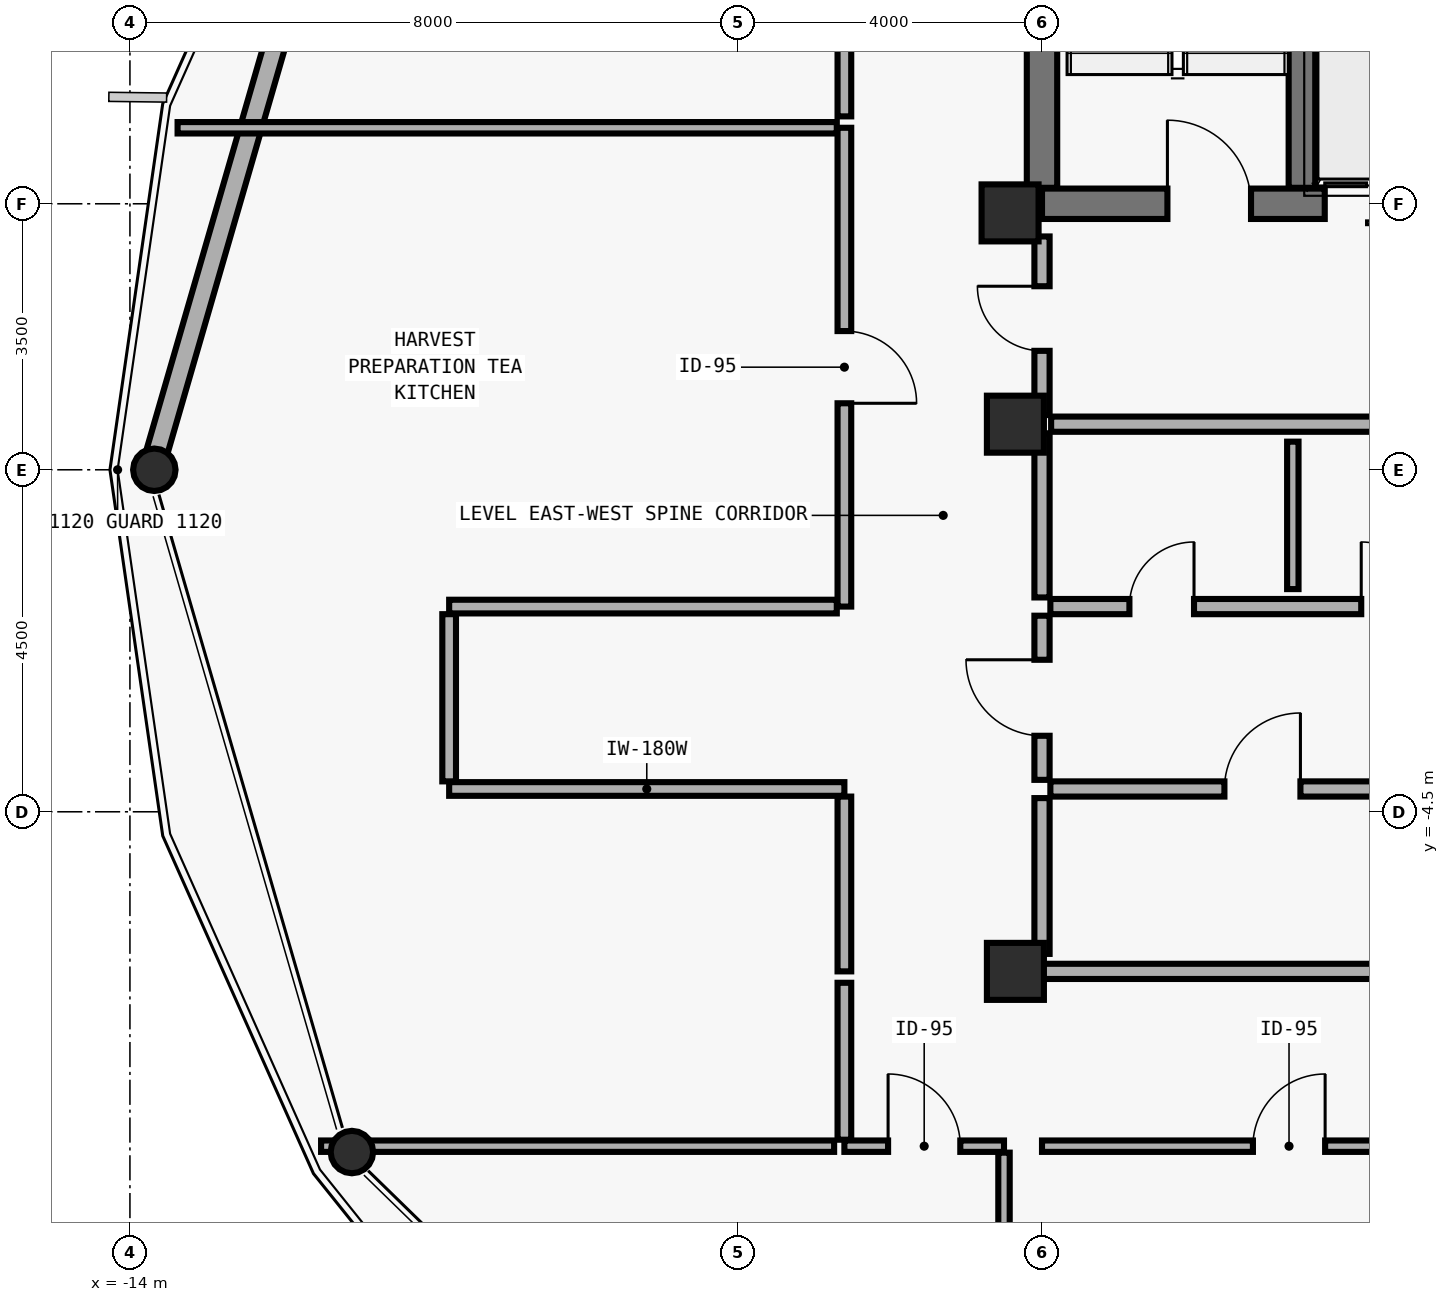
"""IFC4 building model, lengths in metres.
Left out: names, types, materials, properties, quantities, classifications, styles, units other than length and angle.
Written with IfcOpenShell. Run it as: python <this file> out.ifc"""

import sys

from ifc_helpers import new_model, si_unit, direction, frame, frame_2d, origin, origin_2d, place, context, subcontext, project, spatial, rectangle, hollow_circle, extrude, element, fill, save


model = new_model("IFC4")
c1 = context("Model", 3, precision=1e-05, world=origin(), true_north=direction((0.0, 1.0)))
c2 = subcontext(c1, "Body", "Model", "MODEL_VIEW")
j1 = project(units=[si_unit("LENGTHUNIT", "METRE"), si_unit("PLANEANGLEUNIT", "RADIAN")], contexts=[c1])
p1 = place(None, origin())
s1 = spatial("IfcSite", under=j1, at=p1, CompositionType="ELEMENT")
p2 = place(p1, origin())
s2 = spatial("IfcBuilding", under=s1, at=p2, CompositionType="ELEMENT")
p3 = place(p2, frame((0.0, 0.0, 245.4)))
s3 = spatial("IfcBuildingStorey", under=s2, at=p3, CompositionType="ELEMENT", Elevation=245.4)
p4 = place(p3, frame((-2.0, 3.5, 0.0), z_axis=(0.0, 0.0, 1.0), x_axis=(1.0, 0.0, 0.0)))
e1 = element("IfcWall", 1, at=p4, inside=s3, PredefinedType="SHEAR", context=c2, shape_type="SweptSolid", body=[
    extrude(rectangle(XDim=10.0, YDim=0.4, at=frame_2d((5.0, 0.0))), origin(), (0.0, 0.0, 1.0), 3.592),
])
p5 = place(p4, frame((1.65, 0.0, 0.0)))
e2 = element("IfcOpeningElement", 2, at=p5, cuts=e1, PredefinedType="OPENING", context=c2, shape_type="SweptSolid", body=[
    extrude(rectangle(XDim=1.1, YDim=2.15, at=frame_2d((0.55, 1.075))), frame((0.0, 0.21, 0.0), z_axis=(0.0, -1.0, 0.0), x_axis=(1.0, 0.0, 0.0)), (0.0, 0.0, 1.0), 0.42),
])
p6 = place(p4, frame((7.65, 0.0, 0.0)))
e3 = element("IfcOpeningElement", 3, at=p6, cuts=e1, PredefinedType="OPENING", context=c2, shape_type="SweptSolid", body=[
    extrude(rectangle(XDim=1.1, YDim=2.15, at=frame_2d((0.55, 1.075))), frame((0.0, 0.21, 0.0), z_axis=(0.0, -1.0, 0.0), x_axis=(1.0, 0.0, 0.0)), (0.0, 0.0, 1.0), 0.42),
])
p7 = place(p4, frame((3.72, 0.0, 0.0)))
e4 = element("IfcOpeningElement", 4, at=p7, cuts=e1, PredefinedType="OPENING", context=c2, shape_type="SweptSolid", body=[
    extrude(rectangle(XDim=1.1, YDim=2.2, at=frame_2d((0.55, 1.1))), frame((0.0, 0.21, 0.0), z_axis=(0.0, -1.0, 0.0), x_axis=(1.0, 0.0, 0.0)), (0.0, 0.0, 1.0), 0.42),
])
p8 = place(p4, frame((5.18, 0.0, 0.0)))
e5 = element("IfcOpeningElement", 5, at=p8, cuts=e1, PredefinedType="OPENING", context=c2, shape_type="SweptSolid", body=[
    extrude(rectangle(XDim=1.1, YDim=2.2, at=frame_2d((0.55, 1.1))), frame((0.0, 0.21, 0.0), z_axis=(0.0, -1.0, 0.0), x_axis=(1.0, 0.0, 0.0)), (0.0, 0.0, 1.0), 0.42),
])
p9 = place(p3, frame((-2.0, 3.71, 0.0), z_axis=(0.0, 0.0, 1.0), x_axis=(0.0, 1.0, 0.0)))
e6 = element("IfcWall", 6, at=p9, inside=s3, PredefinedType="SHEAR", context=c2, shape_type="SweptSolid", body=[
    extrude(rectangle(XDim=8.58, YDim=0.4, at=frame_2d((4.29, 0.0))), origin(), (0.0, 0.0, 1.0), 3.592),
])
p10 = place(p3, frame((1.42, 3.71, 0.0), z_axis=(0.0, 0.0, 1.0), x_axis=(0.0, 1.0, 0.0)))
e7 = element("IfcWall", 7, at=p10, inside=s3, PredefinedType="SHEAR", context=c2, shape_type="SweptSolid", body=[
    extrude(rectangle(XDim=8.58, YDim=0.35, at=frame_2d((4.29, 0.0))), origin(), (0.0, 0.0, 1.0), 3.592),
])
for number, where, z_axis, x_axis in (
    (8, (-2.42, 3.38, 0.0), (0.0, 0.0, 1.0), (1.0, 0.0, 0.0)),
    (9, (-2.35, 0.6, 0.0), (0.0, 0.0, 1.0), (1.0, 0.0, 0.0)),
    (10, (-2.35, -6.6, 0.0), (0.0, 0.0, 1.0), (1.0, 0.0, 0.0)),
):
    element("IfcColumn", number, at=place(p3, frame(where, z_axis=z_axis, x_axis=x_axis)), inside=s3, PredefinedType="COLUMN", context=c2, shape_type="SweptSolid", body=[
        extrude(rectangle(XDim=0.75, YDim=0.75, at=origin_2d()), origin(), (0.0, 0.0, 1.0), 3.575),
    ])
p11 = place(p3, frame((-13.713, 0.0, 0.0), z_axis=(0.018980464328, 0.0, 0.999819854761), x_axis=(0.0, 1.0, 0.0)))
e11 = element("IfcColumn", 11, at=p11, inside=s3, PredefinedType="COLUMN", context=c2, shape_type="SweptSolid", body=[
    extrude(hollow_circle(Radius=0.28, WallThickness=0.02, at=origin_2d()), origin(), (0.0, 0.0, 1.0), 3.576),
])
p12 = place(p3, frame((-11.109, -8.986, 0.0), z_axis=(0.016454846564, 0.004642861271, 0.999853830249), x_axis=(-0.271555014366, 0.962422918562, 0.0)))
e12 = element("IfcColumn", 12, at=p12, inside=s3, PredefinedType="COLUMN", context=c2, shape_type="SweptSolid", body=[
    extrude(hollow_circle(Radius=0.28, WallThickness=0.02, at=origin_2d()), origin(), (0.0, 0.0, 1.0), 3.576),
])
p13 = place(p3, frame((-13.648, 0.225, 0.0), z_axis=(0.0, 0.0, 1.0), x_axis=(0.278336910571, 0.960483505436, 0.0)))
e13 = element("IfcWall", 13, at=p13, inside=s3, PredefinedType="SOLIDWALL", context=c2, shape_type="SweptSolid", body=[
    extrude(rectangle(XDim=8.886, YDim=0.28, at=frame_2d((4.443, 0.0))), origin(), (0.0, 0.0, 1.0), 2.97),
])
p14 = place(p3, frame((-2.0, 0.72, 0.0), z_axis=(0.0, 0.0, 1.0), x_axis=(0.0, 1.0, 0.0)))
e14 = element("IfcWall", 14, at=p14, inside=s3, PredefinedType="MOVABLE", context=c2, shape_type="SweptSolid", body=[
    extrude(rectangle(XDim=2.35, YDim=0.2, at=frame_2d((1.175, 0.0))), origin(), (0.0, 0.0, 1.0), 2.692),
])
p15 = place(p14, frame((0.845, 0.0, 0.0)))
e15 = element("IfcOpeningElement", 15, at=p15, cuts=e14, PredefinedType="OPENING", context=c2, shape_type="SweptSolid", body=[
    extrude(rectangle(XDim=0.85, YDim=2.1, at=frame_2d((0.425, 1.05))), frame((0.0, 0.11, 0.0), z_axis=(0.0, -1.0, 0.0), x_axis=(1.0, 0.0, 0.0)), (0.0, 0.0, 1.0), 0.22),
])
p16 = place(p3, frame((-2.0, -4.08, 0.0), z_axis=(0.0, 0.0, 1.0), x_axis=(0.0, 1.0, 0.0)))
e16 = element("IfcWall", 16, at=p16, inside=s3, PredefinedType="MOVABLE", context=c2, shape_type="SweptSolid", body=[
    extrude(rectangle(XDim=2.16, YDim=0.2, at=frame_2d((1.08, 0.0))), origin(), (0.0, 0.0, 1.0), 3.072),
])
p17 = place(p16, frame((0.58, 0.0, 0.0)))
e17 = element("IfcOpeningElement", 17, at=p17, cuts=e16, PredefinedType="OPENING", context=c2, shape_type="SweptSolid", body=[
    extrude(rectangle(XDim=1.0, YDim=2.1, at=frame_2d((0.5, 1.05))), frame((0.0, 0.11, 0.0), z_axis=(0.0, -1.0, 0.0), x_axis=(1.0, 0.0, 0.0)), (0.0, 0.0, 1.0), 0.22),
])
p18 = place(p3, frame((-1.89, -1.8, 0.0), z_axis=(0.0, 0.0, 1.0), x_axis=(1.0, 0.0, 0.0)))
e18 = element("IfcWall", 18, at=p18, inside=s3, PredefinedType="MOVABLE", context=c2, shape_type="SweptSolid", body=[
    extrude(rectangle(XDim=5.73, YDim=0.2, at=frame_2d((2.865, 0.0))), origin(), (0.0, 0.0, 1.0), 3.36),
])
p19 = place(p18, frame((1.04, 0.0, 0.0)))
e19 = element("IfcOpeningElement", 19, at=p19, cuts=e18, PredefinedType="OPENING", context=c2, shape_type="SweptSolid", body=[
    extrude(rectangle(XDim=0.85, YDim=2.1, at=frame_2d((0.425, 1.05))), frame((0.0, 0.11, 0.0), z_axis=(0.0, -1.0, 0.0), x_axis=(1.0, 0.0, 0.0)), (0.0, 0.0, 1.0), 0.22),
])
p20 = place(p18, frame((4.09, 0.0, 0.0)))
e20 = element("IfcOpeningElement", 20, at=p20, cuts=e18, PredefinedType="OPENING", context=c2, shape_type="SweptSolid", body=[
    extrude(rectangle(XDim=0.85, YDim=2.1, at=frame_2d((0.425, 1.05))), frame((0.0, 0.11, 0.0), z_axis=(0.0, -1.0, 0.0), x_axis=(1.0, 0.0, 0.0)), (0.0, 0.0, 1.0), 0.22),
])
p21 = place(p3, frame((-1.89, -4.2, 0.0), z_axis=(0.0, 0.0, 1.0), x_axis=(1.0, 0.0, 0.0)))
e21 = element("IfcWall", 21, at=p21, inside=s3, PredefinedType="MOVABLE", context=c2, shape_type="SweptSolid", body=[
    extrude(rectangle(XDim=5.73, YDim=0.2, at=frame_2d((2.865, 0.0))), origin(), (0.0, 0.0, 1.0), 3.36),
])
p22 = place(p21, frame((2.29, 0.0, 0.0)))
e22 = element("IfcOpeningElement", 22, at=p22, cuts=e21, PredefinedType="OPENING", context=c2, shape_type="SweptSolid", body=[
    extrude(rectangle(XDim=1.0, YDim=2.1, at=frame_2d((0.5, 1.05))), frame((0.0, 0.11, 0.0), z_axis=(0.0, -1.0, 0.0), x_axis=(1.0, 0.0, 0.0)), (0.0, 0.0, 1.0), 0.22),
])
p23 = place(p3, frame((-4.6, -8.9, 0.0), z_axis=(0.0, 0.0, 1.0), x_axis=(1.0, 0.0, 0.0)))
e23 = element("IfcWall", 23, at=p23, inside=s3, PredefinedType="PARTITIONING", context=c2, shape_type="SweptSolid", body=[
    extrude(rectangle(XDim=2.1, YDim=0.15, at=frame_2d((1.05, 0.0))), origin(), (0.0, 0.0, 1.0), 3.36),
])
p24 = place(p23, frame((0.575, 0.0, 0.0)))
e24 = element("IfcOpeningElement", 24, at=p24, cuts=e23, PredefinedType="OPENING", context=c2, shape_type="SweptSolid", body=[
    extrude(rectangle(XDim=0.95, YDim=2.1, at=frame_2d((0.475, 1.05))), frame((0.0, 0.085, 0.0), z_axis=(0.0, -1.0, 0.0), x_axis=(1.0, 0.0, 0.0)), (0.0, 0.0, 1.0), 0.17),
])
p25 = place(p3, frame((-2.0, -8.9, 0.0), z_axis=(0.0, 0.0, 1.0), x_axis=(1.0, 0.0, 0.0)))
e25 = element("IfcWall", 25, at=p25, inside=s3, PredefinedType="PARTITIONING", context=c2, shape_type="SweptSolid", body=[
    extrude(rectangle(XDim=6.5, YDim=0.15, at=frame_2d((3.25, 0.0))), origin(), (0.0, 0.0, 1.0), 3.36),
])
p26 = place(p25, frame((2.775, 0.0, 0.0)))
e26 = element("IfcOpeningElement", 26, at=p26, cuts=e25, PredefinedType="OPENING", context=c2, shape_type="SweptSolid", body=[
    extrude(rectangle(XDim=0.95, YDim=2.1, at=frame_2d((0.475, 1.05))), frame((0.0, 0.085, 0.0), z_axis=(0.0, -1.0, 0.0), x_axis=(1.0, 0.0, 0.0)), (0.0, 0.0, 1.0), 0.17),
])
p27 = place(p3, frame((-4.6, 4.5, 0.0), z_axis=(0.0, 0.0, 1.0), x_axis=(0.0, -1.0, 0.0)))
e27 = element("IfcWall", 27, at=p27, inside=s3, PredefinedType="PLUMBINGWALL", context=c2, shape_type="SweptSolid", body=[
    extrude(rectangle(XDim=6.3, YDim=0.18, at=frame_2d((3.15, 0.0))), origin(), (0.0, 0.0, 1.0), 3.36),
])
p28 = place(p27, frame((2.675, 0.0, 0.0)))
e28 = element("IfcOpeningElement", 28, at=p28, cuts=e27, PredefinedType="OPENING", context=c2, shape_type="SweptSolid", body=[
    extrude(rectangle(XDim=0.95, YDim=2.1, at=frame_2d((0.475, 1.05))), frame((0.0, 0.1, 0.0), z_axis=(0.0, -1.0, 0.0), x_axis=(1.0, 0.0, 0.0)), (0.0, 0.0, 1.0), 0.2),
])
p29 = place(p3, frame((-1.88, 0.6, 0.0), z_axis=(0.0, 0.0, 1.0), x_axis=(1.0, 0.0, 0.0)))
e29 = element("IfcWall", 29, at=p29, inside=s3, PredefinedType="MOVABLE", context=c2, shape_type="SweptSolid", body=[
    extrude(rectangle(XDim=5.72, YDim=0.2, at=frame_2d((2.86, 0.0))), origin(), (0.0, 0.0, 1.0), 3.072),
])
p30 = place(p3, frame((1.3, -1.57, 0.0), z_axis=(0.0, 0.0, 1.0), x_axis=(0.0, 1.0, 0.0)))
e30 = element("IfcWall", 30, at=p30, inside=s3, PredefinedType="PARTITIONING", context=c2, shape_type="SweptSolid", body=[
    extrude(rectangle(XDim=1.94, YDim=0.15, at=frame_2d((0.97, 0.0))), origin(), (0.0, 0.0, 1.0), 3.36),
])
p31 = place(p3, frame((-2.0, -1.68, 0.0), z_axis=(0.0, 0.0, 1.0), x_axis=(0.0, 1.0, 0.0)))
e31 = element("IfcWall", 31, at=p31, inside=s3, PredefinedType="MOVABLE", context=c2, shape_type="SweptSolid", body=[
    extrude(rectangle(XDim=2.16, YDim=0.2, at=frame_2d((1.08, 0.0))), origin(), (0.0, 0.0, 1.0), 3.072),
])
p32 = place(p3, frame((-2.0, -6.6, 0.0), z_axis=(0.0, 0.0, 1.0), x_axis=(1.0, 0.0, 0.0)))
e32 = element("IfcWall", 32, at=p32, inside=s3, PredefinedType="MOVABLE", context=c2, shape_type="SweptSolid", body=[
    extrude(rectangle(XDim=5.84, YDim=0.2, at=frame_2d((2.92, 0.0))), origin(), (0.0, 0.0, 1.0), 3.072),
])
p33 = place(p3, frame((-2.0, -6.37, 0.0), z_axis=(0.0, 0.0, 1.0), x_axis=(0.0, 1.0, 0.0)))
e33 = element("IfcWall", 33, at=p33, inside=s3, PredefinedType="MOVABLE", context=c2, shape_type="SweptSolid", body=[
    extrude(rectangle(XDim=2.05, YDim=0.2, at=frame_2d((1.025, 0.0))), origin(), (0.0, 0.0, 1.0), 3.072),
])
p34 = place(p3, frame((-2.5, -8.985, 0.0), z_axis=(0.0, 0.0, 1.0), x_axis=(0.0, -1.0, 0.0)))
e34 = element("IfcWall", 34, at=p34, inside=s3, PredefinedType="PARTITIONING", context=c2, shape_type="SweptSolid", body=[
    extrude(rectangle(XDim=7.706, YDim=0.15, at=frame_2d((3.853, 0.0))), origin(), (0.0, 0.0, 1.0), 2.892),
])
p35 = place(p3, frame((-11.485, -8.9, 0.0), z_axis=(0.0, 0.0, 1.0), x_axis=(1.0, 0.0, 0.0)))
e35 = element("IfcWall", 35, at=p35, inside=s3, PredefinedType="PARTITIONING", context=c2, shape_type="SweptSolid", body=[
    extrude(rectangle(XDim=6.75, YDim=0.15, at=frame_2d((3.375, 0.0))), origin(), (0.0, 0.0, 1.0), 2.892),
])
p36 = place(p3, frame((-4.7, -1.8, 0.0), z_axis=(0.0, 0.0, 1.0), x_axis=(-1.0, 0.0, 0.0)))
e36 = element("IfcWall", 36, at=p36, inside=s3, PredefinedType="PLUMBINGWALL", context=c2, shape_type="SweptSolid", body=[
    extrude(rectangle(XDim=5.1, YDim=0.18, at=frame_2d((2.55, 0.0))), origin(), (0.0, 0.0, 1.0), 3.36),
])
p37 = place(p3, frame((-9.8, -4.2, 0.0), z_axis=(0.0, 0.0, 1.0), x_axis=(1.0, 0.0, 0.0)))
e37 = element("IfcWall", 37, at=p37, inside=s3, PredefinedType="PLUMBINGWALL", context=c2, shape_type="SweptSolid", body=[
    extrude(rectangle(XDim=5.2, YDim=0.18, at=frame_2d((2.6, 0.0))), origin(), (0.0, 0.0, 1.0), 3.36),
])
p38 = place(p3, frame((-9.8, -1.9, 0.0), z_axis=(0.0, 0.0, 1.0), x_axis=(0.0, -1.0, 0.0)))
e38 = element("IfcWall", 38, at=p38, inside=s3, PredefinedType="PLUMBINGWALL", context=c2, shape_type="SweptSolid", body=[
    extrude(rectangle(XDim=2.2, YDim=0.18, at=frame_2d((1.1, 0.0))), origin(), (0.0, 0.0, 1.0), 3.36),
])
p39 = place(p3, frame((-4.6, -4.3, 0.0), z_axis=(0.0, 0.0, 1.0), x_axis=(0.0, -1.0, 0.0)))
e39 = element("IfcWall", 39, at=p39, inside=s3, PredefinedType="PLUMBINGWALL", context=c2, shape_type="SweptSolid", body=[
    extrude(rectangle(XDim=2.3, YDim=0.18, at=frame_2d((1.15, 0.0))), origin(), (0.0, 0.0, 1.0), 3.36),
])
p40 = place(p3, frame((-4.6, -6.75, 0.0), z_axis=(0.0, 0.0, 1.0), x_axis=(0.0, -1.0, 0.0)))
e40 = element("IfcWall", 40, at=p40, inside=s3, PredefinedType="PLUMBINGWALL", context=c2, shape_type="SweptSolid", body=[
    extrude(rectangle(XDim=2.065, YDim=0.18, at=frame_2d((1.032, 0.0))), origin(), (0.0, 0.0, 1.0), 3.36),
])
p41 = place(p3, frame((-13.373, 4.5, 0.0), z_axis=(0.0, 0.0, 1.0), x_axis=(1.0, 0.0, 0.0)))
e41 = element("IfcWall", 41, at=p41, inside=s3, PredefinedType="PARTITIONING", context=c2, shape_type="SweptSolid", body=[
    extrude(rectangle(XDim=8.673, YDim=0.15, at=frame_2d((4.336, 0.0))), origin(), (0.0, 0.0, 1.0), 3.36),
])
p42 = place(p3, frame((-4.6, 5.9, 0.0), z_axis=(0.0, 0.0, 1.0), x_axis=(0.0, -1.0, 0.0)))
e42 = element("IfcWall", 42, at=p42, inside=s3, PredefinedType="PLUMBINGWALL", context=c2, shape_type="SweptSolid", body=[
    extrude(rectangle(XDim=1.25, YDim=0.18, at=frame_2d((0.625, 0.0))), origin(), (0.0, 0.0, 1.0), 3.36),
])
p43 = place(p5, origin())
e43 = element("IfcDoor", 43, at=p43, inside=s3, OperationType="SINGLE_SWING_LEFT", PredefinedType="DOOR", context=c2, shape_type="SweptSolid", body=[
    extrude(rectangle(XDim=1.1, YDim=2.15, at=frame_2d((0.55, 1.075))), frame((0.0, 0.025, 0.0), z_axis=(0.0, -1.0, 0.0), x_axis=(1.0, 0.0, 0.0)), (0.0, 0.0, 1.0), 0.05),
])
fill(e2, e43)
p44 = place(p7, origin())
e44 = element("IfcDoor", 44, at=p44, inside=s3, OperationType="DOUBLE_DOOR_SLIDING", PredefinedType="DOOR", context=c2, shape_type="SweptSolid", body=[
    extrude(rectangle(XDim=1.1, YDim=2.2, at=frame_2d((0.55, 1.1))), frame((0.0, 0.025, 0.0), z_axis=(0.0, -1.0, 0.0), x_axis=(1.0, 0.0, 0.0)), (0.0, 0.0, 1.0), 0.05),
])
fill(e4, e44)
p45 = place(p15, origin())
e45 = element("IfcDoor", 45, at=p45, inside=s3, OperationType="SINGLE_SWING_RIGHT", PredefinedType="DOOR", context=c2, shape_type="SweptSolid", body=[
    extrude(rectangle(XDim=0.85, YDim=2.1, at=frame_2d((0.425, 1.05))), frame((0.0, 0.025, 0.0), z_axis=(0.0, -1.0, 0.0), x_axis=(1.0, 0.0, 0.0)), (0.0, 0.0, 1.0), 0.05),
])
fill(e15, e45)
p46 = place(p17, origin())
e46 = element("IfcDoor", 46, at=p46, inside=s3, OperationType="SINGLE_SWING_RIGHT", PredefinedType="DOOR", context=c2, shape_type="SweptSolid", body=[
    extrude(rectangle(XDim=1.0, YDim=2.1, at=frame_2d((0.5, 1.05))), frame((0.0, 0.025, 0.0), z_axis=(0.0, -1.0, 0.0), x_axis=(1.0, 0.0, 0.0)), (0.0, 0.0, 1.0), 0.05),
])
fill(e17, e46)
p47 = place(p19, origin())
e47 = element("IfcDoor", 47, at=p47, inside=s3, OperationType="SINGLE_SWING_RIGHT", PredefinedType="DOOR", context=c2, shape_type="SweptSolid", body=[
    extrude(rectangle(XDim=0.85, YDim=2.1, at=frame_2d((0.425, 1.05))), frame((0.0, 0.025, 0.0), z_axis=(0.0, -1.0, 0.0), x_axis=(1.0, 0.0, 0.0)), (0.0, 0.0, 1.0), 0.05),
])
fill(e19, e47)
p48 = place(p20, origin())
e48 = element("IfcDoor", 48, at=p48, inside=s3, OperationType="SINGLE_SWING_LEFT", PredefinedType="DOOR", context=c2, shape_type="SweptSolid", body=[
    extrude(rectangle(XDim=0.85, YDim=2.1, at=frame_2d((0.425, 1.05))), frame((0.0, 0.025, 0.0), z_axis=(0.0, -1.0, 0.0), x_axis=(1.0, 0.0, 0.0)), (0.0, 0.0, 1.0), 0.05),
])
fill(e20, e48)
p49 = place(p22, origin())
e49 = element("IfcDoor", 49, at=p49, inside=s3, OperationType="SINGLE_SWING_RIGHT", PredefinedType="DOOR", context=c2, shape_type="SweptSolid", body=[
    extrude(rectangle(XDim=1.0, YDim=2.1, at=frame_2d((0.5, 1.05))), frame((0.0, 0.025, 0.0), z_axis=(0.0, -1.0, 0.0), x_axis=(1.0, 0.0, 0.0)), (0.0, 0.0, 1.0), 0.05),
])
fill(e22, e49)
p50 = place(p24, origin())
e50 = element("IfcDoor", 50, at=p50, inside=s3, OperationType="SINGLE_SWING_LEFT", PredefinedType="DOOR", context=c2, shape_type="SweptSolid", body=[
    extrude(rectangle(XDim=0.95, YDim=2.1, at=frame_2d((0.475, 1.05))), frame((0.0, 0.025, 0.0), z_axis=(0.0, -1.0, 0.0), x_axis=(1.0, 0.0, 0.0)), (0.0, 0.0, 1.0), 0.05),
])
fill(e24, e50)
p51 = place(p26, origin())
e51 = element("IfcDoor", 51, at=p51, inside=s3, OperationType="SINGLE_SWING_RIGHT", PredefinedType="DOOR", context=c2, shape_type="SweptSolid", body=[
    extrude(rectangle(XDim=0.95, YDim=2.1, at=frame_2d((0.475, 1.05))), frame((0.0, 0.025, 0.0), z_axis=(0.0, -1.0, 0.0), x_axis=(1.0, 0.0, 0.0)), (0.0, 0.0, 1.0), 0.05),
])
fill(e26, e51)
p52 = place(p28, origin())
e52 = element("IfcDoor", 52, at=p52, inside=s3, OperationType="SINGLE_SWING_RIGHT", PredefinedType="DOOR", context=c2, shape_type="SweptSolid", body=[
    extrude(rectangle(XDim=0.95, YDim=2.1, at=frame_2d((0.475, 1.05))), frame((0.0, 0.025, 0.0), z_axis=(0.0, -1.0, 0.0), x_axis=(1.0, 0.0, 0.0)), (0.0, 0.0, 1.0), 0.05),
])
fill(e28, e52)
save(model, sys.argv[1])
